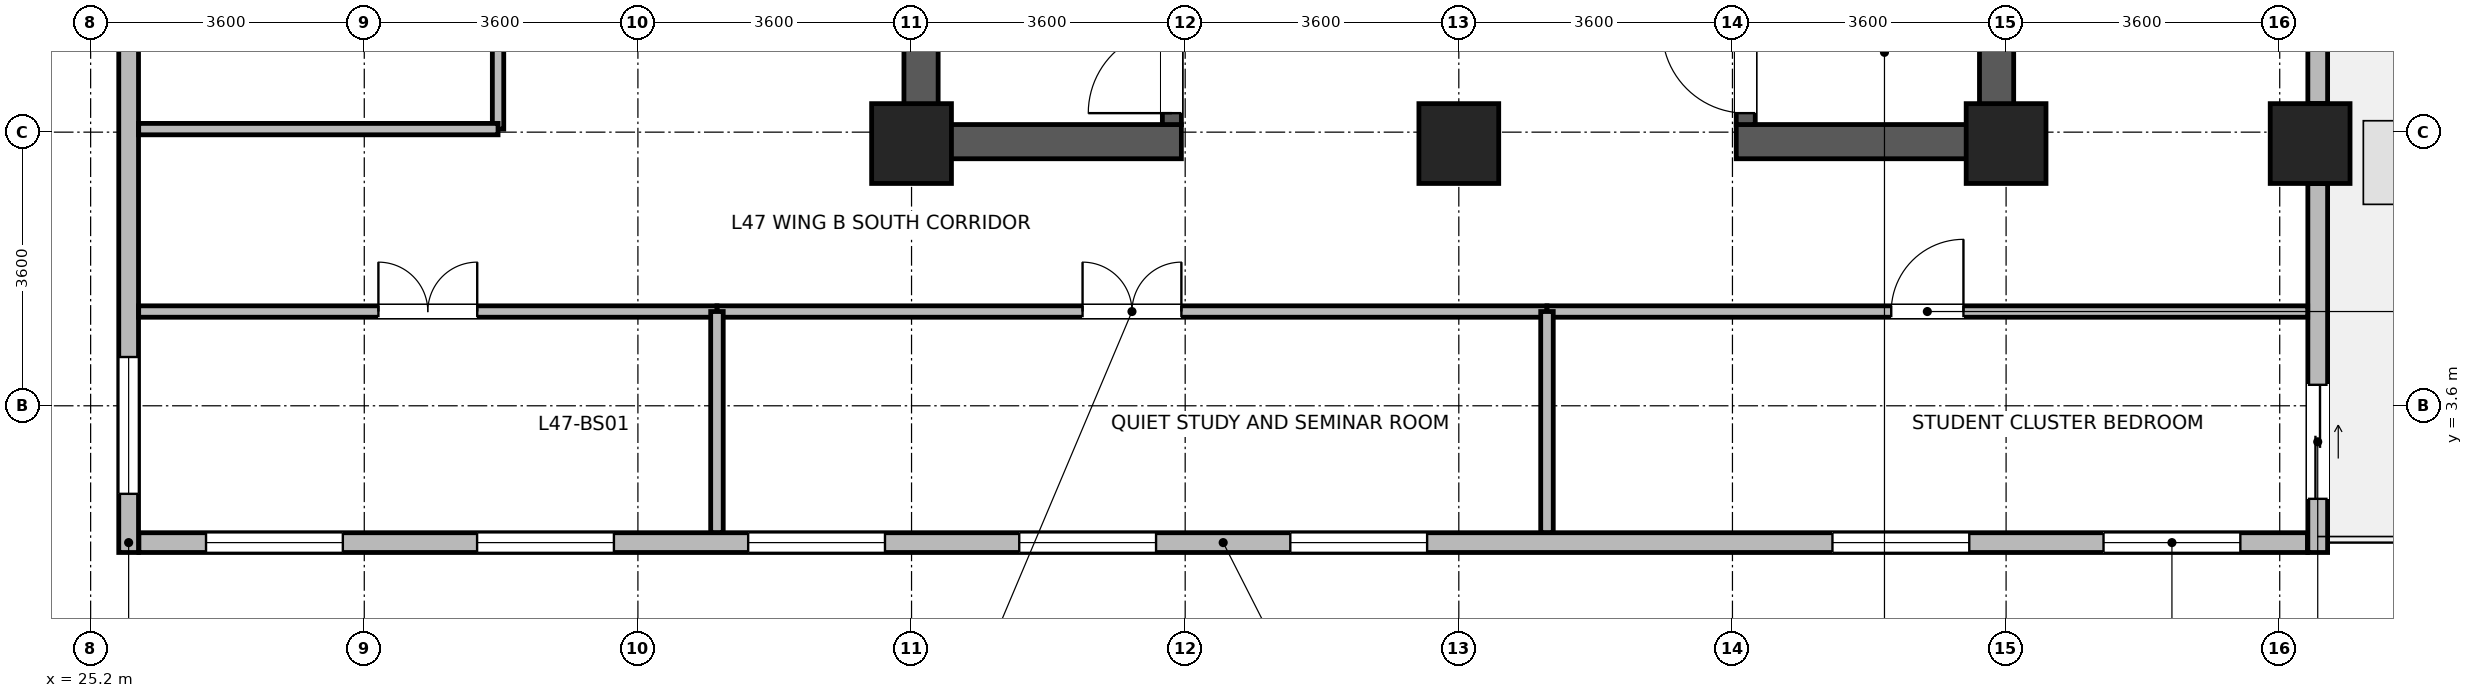
"""IFC4 building model, lengths in metres.
Left out: names, types, materials, properties, quantities, classifications, styles, units other than length and angle.
Written with IfcOpenShell. Run it as: python <this file> out.ifc"""

import sys

from ifc_helpers import new_model, si_unit, direction, frame, frame_2d, origin, origin_2d, place, context, subcontext, project, spatial, rectangle, extrude, source, transform, mapped, element, fill, save


model = new_model("IFC4")
c1 = context("Model", 3, precision=1e-05, world=origin(), true_north=direction((0.0, 1.0)))
c2 = subcontext(c1, "Body", "Model", "MODEL_VIEW")
j1 = project(units=[si_unit("LENGTHUNIT", "METRE"), si_unit("PLANEANGLEUNIT", "RADIAN")], contexts=[c1])
p1 = place(None, origin())
s1 = spatial("IfcSite", under=j1, at=p1, CompositionType="ELEMENT")
p2 = place(p1, origin())
s2 = spatial("IfcBuilding", under=s1, at=p2, CompositionType="ELEMENT")
p3 = place(p2, frame((0.0, 0.0, 184.6)))
s3 = spatial("IfcBuildingStorey", under=s2, at=p3, CompositionType="ELEMENT", Elevation=184.6)
for number, where, z_axis, x_axis in (
    (1, (36.125, 6.85, 0.0), (0.0, 0.0, 1.0), (0.0, 1.0, 0.0)),
    (2, (50.275, 6.85, 0.0), (0.0, 0.0, 1.0), (0.0, 1.0, 0.0)),
):
    element("IfcWall", number, at=place(p3, frame(where, z_axis=z_axis, x_axis=x_axis)), inside=s3, PredefinedType="SHEAR", context=c2, shape_type="SweptSolid", body=[
        extrude(rectangle(XDim=7.9, YDim=0.45, at=frame_2d((3.95, 0.0))), origin(), (0.0, 0.0, 1.0), 3.46),
    ])
for number, where, z_axis, x_axis in (
    (3, (36.35, 7.075, 0.0), (0.0, 0.0, 1.0), (1.0, 0.0, 0.0)),
    (4, (46.85, 7.075, 0.0), (0.0, 0.0, 1.0), (1.0, 0.0, 0.0)),
):
    element("IfcWall", number, at=place(p3, frame(where, z_axis=z_axis, x_axis=x_axis)), inside=s3, PredefinedType="SHEAR", context=c2, shape_type="SweptSolid", body=[
        extrude(rectangle(XDim=3.2, YDim=0.45, at=frame_2d((1.6, 0.0))), origin(), (0.0, 0.0, 1.0), 3.46),
    ])
p4 = place(p3, frame((39.425, 7.3, 0.0), z_axis=(0.0, 0.0, 1.0), x_axis=(0.0, 1.0, 0.0)))
e5 = element("IfcWall", 5, at=p4, inside=s3, PredefinedType="SHEAR", context=c2, shape_type="SweptSolid", body=[
    extrude(rectangle(XDim=7.0, YDim=0.25, at=frame_2d((3.5, 0.0))), origin(), (0.0, 0.0, 1.0), 3.46),
])
p5 = place(p4, frame((0.15, 0.0, 0.0)))
e6 = element("IfcOpeningElement", 6, at=p5, cuts=e5, PredefinedType="OPENING", context=c2, shape_type="SweptSolid", body=[
    extrude(rectangle(XDim=1.1, YDim=2.08, at=frame_2d((0.55, 1.04))), frame((0.0, 0.135, 0.0), z_axis=(0.0, -1.0, 0.0), x_axis=(1.0, 0.0, 0.0)), (0.0, 0.0, 1.0), 0.27),
])
p6 = place(p3, frame((46.975, 7.3, 0.0), z_axis=(0.0, 0.0, 1.0), x_axis=(0.0, 1.0, 0.0)))
e7 = element("IfcWall", 7, at=p6, inside=s3, PredefinedType="SHEAR", context=c2, shape_type="SweptSolid", body=[
    extrude(rectangle(XDim=7.0, YDim=0.25, at=frame_2d((3.5, 0.0))), origin(), (0.0, 0.0, 1.0), 3.46),
])
p7 = place(p6, frame((0.15, 0.0, 0.0)))
e8 = element("IfcOpeningElement", 8, at=p7, cuts=e7, PredefinedType="OPENING", context=c2, shape_type="SweptSolid", body=[
    extrude(rectangle(XDim=1.1, YDim=2.08, at=frame_2d((0.55, 1.04))), frame((0.0, 0.135, 0.0), z_axis=(0.0, -1.0, 0.0), x_axis=(1.0, 0.0, 0.0)), (0.0, 0.0, 1.0), 0.27),
])
m1 = source(origin(), c2, "Body", "SweptSolid", [
    extrude(rectangle(XDim=1.05, YDim=1.05, at=origin_2d()), origin(), (0.0, 0.0, 1.0), 3.7),
])
for number, where, z_axis, x_axis in (
    (9, (36.0, 7.05, 0.0), (0.0, 0.0, 1.0), (1.0, 0.0, 0.0)),
    (10, (43.2, 7.05, 0.0), (0.0, 0.0, 1.0), (1.0, 0.0, 0.0)),
    (11, (50.4, 7.05, 0.0), (0.0, 0.0, 1.0), (1.0, 0.0, 0.0)),
    (12, (54.4, 7.05, 0.0), (0.0, 0.0, 1.0), (1.0, 0.0, 0.0)),
):
    element("IfcColumn", number, at=place(p3, frame(where, z_axis=z_axis, x_axis=x_axis)), inside=s3, PredefinedType="COLUMN", context=c2, shape_type="MappedRepresentation", body=[
        mapped(m1, transform((0.0, 0.0, 0.0), x_axis=(1.0, 0.0, 0.0), y_axis=(0.0, 1.0, 0.0), z_axis=(0.0, 0.0, 1.0), scale=1.0)),
    ])
p8 = place(p3, frame((54.365, 1.8, 0.0), z_axis=(0.0, 0.0, 1.0), x_axis=(-1.0, 0.0, 0.0)))
e13 = element("IfcWall", 13, at=p8, inside=s3, PredefinedType="STANDARD", context=c2, shape_type="SweptSolid", body=[
    extrude(rectangle(XDim=28.53, YDim=0.26, at=frame_2d((14.265, 0.0))), origin(), (0.0, 0.0, 1.0), 3.44),
])
p9 = place(p8, frame((0.883, 0.0, 0.85)))
e14 = element("IfcOpeningElement", 14, at=p9, cuts=e13, PredefinedType="OPENING", context=c2, shape_type="SweptSolid", body=[
    extrude(rectangle(XDim=1.8, YDim=1.85, at=frame_2d((0.9, 0.925))), frame((0.0, 0.14, 0.0), z_axis=(0.0, -1.0, 0.0), x_axis=(1.0, 0.0, 0.0)), (0.0, 0.0, 1.0), 0.28),
])
p10 = place(p8, frame((4.449, 0.0, 0.85)))
e15 = element("IfcOpeningElement", 15, at=p10, cuts=e13, PredefinedType="OPENING", context=c2, shape_type="SweptSolid", body=[
    extrude(rectangle(XDim=1.8, YDim=1.85, at=frame_2d((0.9, 0.925))), frame((0.0, 0.14, 0.0), z_axis=(0.0, -1.0, 0.0), x_axis=(1.0, 0.0, 0.0)), (0.0, 0.0, 1.0), 0.28),
])
p11 = place(p8, frame((11.582, 0.0, 0.85)))
e16 = element("IfcOpeningElement", 16, at=p11, cuts=e13, PredefinedType="OPENING", context=c2, shape_type="SweptSolid", body=[
    extrude(rectangle(XDim=1.8, YDim=1.85, at=frame_2d((0.9, 0.925))), frame((0.0, 0.14, 0.0), z_axis=(0.0, -1.0, 0.0), x_axis=(1.0, 0.0, 0.0)), (0.0, 0.0, 1.0), 0.28),
])
p12 = place(p8, frame((15.148, 0.0, 0.85)))
e17 = element("IfcOpeningElement", 17, at=p12, cuts=e13, PredefinedType="OPENING", context=c2, shape_type="SweptSolid", body=[
    extrude(rectangle(XDim=1.8, YDim=1.85, at=frame_2d((0.9, 0.925))), frame((0.0, 0.14, 0.0), z_axis=(0.0, -1.0, 0.0), x_axis=(1.0, 0.0, 0.0)), (0.0, 0.0, 1.0), 0.28),
])
p13 = place(p8, frame((18.714, 0.0, 0.85)))
e18 = element("IfcOpeningElement", 18, at=p13, cuts=e13, PredefinedType="OPENING", context=c2, shape_type="SweptSolid", body=[
    extrude(rectangle(XDim=1.8, YDim=1.85, at=frame_2d((0.9, 0.925))), frame((0.0, 0.14, 0.0), z_axis=(0.0, -1.0, 0.0), x_axis=(1.0, 0.0, 0.0)), (0.0, 0.0, 1.0), 0.28),
])
p14 = place(p8, frame((22.281, 0.0, 0.85)))
e19 = element("IfcOpeningElement", 19, at=p14, cuts=e13, PredefinedType="OPENING", context=c2, shape_type="SweptSolid", body=[
    extrude(rectangle(XDim=1.8, YDim=1.85, at=frame_2d((0.9, 0.925))), frame((0.0, 0.14, 0.0), z_axis=(0.0, -1.0, 0.0), x_axis=(1.0, 0.0, 0.0)), (0.0, 0.0, 1.0), 0.28),
])
p15 = place(p8, frame((25.847, 0.0, 0.85)))
e20 = element("IfcOpeningElement", 20, at=p15, cuts=e13, PredefinedType="OPENING", context=c2, shape_type="SweptSolid", body=[
    extrude(rectangle(XDim=1.8, YDim=1.85, at=frame_2d((0.9, 0.925))), frame((0.0, 0.14, 0.0), z_axis=(0.0, -1.0, 0.0), x_axis=(1.0, 0.0, 0.0)), (0.0, 0.0, 1.0), 0.28),
])
p16 = place(p3, frame((54.5, 6.524, 0.0), z_axis=(0.0, 0.0, 1.0), x_axis=(0.0, -1.0, 0.0)))
e21 = element("IfcWall", 21, at=p16, inside=s3, PredefinedType="STANDARD", context=c2, shape_type="SweptSolid", body=[
    extrude(rectangle(XDim=4.854, YDim=0.26, at=frame_2d((2.427, 0.0))), origin(), (0.0, 0.0, 1.0), 3.44),
])
p17 = place(p16, frame((2.648, 0.0, 0.0)))
e22 = element("IfcOpeningElement", 22, at=p17, cuts=e21, PredefinedType="OPENING", context=c2, shape_type="SweptSolid", body=[
    extrude(rectangle(XDim=1.5, YDim=2.15, at=frame_2d((0.75, 1.075))), frame((0.0, 0.14, 0.0), z_axis=(0.0, -1.0, 0.0), x_axis=(1.0, 0.0, 0.0)), (0.0, 0.0, 1.0), 0.28),
])
p18 = place(p3, frame((54.5, 14.024, 0.0), z_axis=(0.0, 0.0, 1.0), x_axis=(0.0, -1.0, 0.0)))
e23 = element("IfcWall", 23, at=p18, inside=s3, PredefinedType="STANDARD", context=c2, shape_type="SweptSolid", body=[
    extrude(rectangle(XDim=6.448, YDim=0.26, at=frame_2d((3.224, 0.0))), origin(), (0.0, 0.0, 1.0), 2.99),
])
p19 = place(p18, frame((3.936, 0.0, 0.85)))
e24 = element("IfcOpeningElement", 24, at=p19, cuts=e23, PredefinedType="OPENING", context=c2, shape_type="SweptSolid", body=[
    extrude(rectangle(XDim=1.8, YDim=1.85, at=frame_2d((0.9, 0.925))), frame((0.0, 0.14, 0.0), z_axis=(0.0, -1.0, 0.0), x_axis=(1.0, 0.0, 0.0)), (0.0, 0.0, 1.0), 0.28),
])
p20 = place(p18, frame((1.15, 0.0, 0.85)))
e25 = element("IfcOpeningElement", 25, at=p20, cuts=e23, PredefinedType="OPENING", context=c2, shape_type="SweptSolid", body=[
    extrude(rectangle(XDim=0.95, YDim=1.75, at=frame_2d((0.475, 0.875))), frame((0.0, 0.14, 0.0), z_axis=(0.0, -1.0, 0.0), x_axis=(1.0, 0.0, 0.0)), (0.0, 0.0, 1.0), 0.28),
])
p21 = place(p3, frame((25.7, 1.67, 0.0), z_axis=(0.0, 0.0, 1.0), x_axis=(0.0, 1.0, 0.0)))
e26 = element("IfcWall", 26, at=p21, inside=s3, PredefinedType="STANDARD", context=c2, shape_type="SweptSolid", body=[
    extrude(rectangle(XDim=20.06, YDim=0.26, at=frame_2d((10.03, 0.0))), origin(), (0.0, 0.0, 1.0), 3.44),
])
p22 = place(p21, frame((0.772, 0.0, 0.85)))
e27 = element("IfcOpeningElement", 27, at=p22, cuts=e26, PredefinedType="OPENING", context=c2, shape_type="SweptSolid", body=[
    extrude(rectangle(XDim=1.8, YDim=1.85, at=frame_2d((0.9, 0.925))), frame((0.0, 0.14, 0.0), z_axis=(0.0, -1.0, 0.0), x_axis=(1.0, 0.0, 0.0)), (0.0, 0.0, 1.0), 0.28),
])
p23 = place(p21, frame((7.458, 0.0, 0.85)))
e28 = element("IfcOpeningElement", 28, at=p23, cuts=e26, PredefinedType="OPENING", context=c2, shape_type="SweptSolid", body=[
    extrude(rectangle(XDim=1.8, YDim=1.85, at=frame_2d((0.9, 0.925))), frame((0.0, 0.14, 0.0), z_axis=(0.0, -1.0, 0.0), x_axis=(1.0, 0.0, 0.0)), (0.0, 0.0, 1.0), 0.28),
])
p24 = place(p21, frame((14.145, 0.0, 0.85)))
e29 = element("IfcOpeningElement", 29, at=p24, cuts=e26, PredefinedType="OPENING", context=c2, shape_type="SweptSolid", body=[
    extrude(rectangle(XDim=1.8, YDim=1.85, at=frame_2d((0.9, 0.925))), frame((0.0, 0.14, 0.0), z_axis=(0.0, -1.0, 0.0), x_axis=(1.0, 0.0, 0.0)), (0.0, 0.0, 1.0), 0.28),
])
p25 = place(p21, frame((17.488, 0.0, 0.85)))
e30 = element("IfcOpeningElement", 30, at=p25, cuts=e26, PredefinedType="OPENING", context=c2, shape_type="SweptSolid", body=[
    extrude(rectangle(XDim=1.8, YDim=1.85, at=frame_2d((0.9, 0.925))), frame((0.0, 0.14, 0.0), z_axis=(0.0, -1.0, 0.0), x_axis=(1.0, 0.0, 0.0)), (0.0, 0.0, 1.0), 0.28),
])
p26 = place(p3, frame((33.44, 4.84, 0.0), z_axis=(0.0, 0.0, 1.0), x_axis=(1.0, 0.0, 0.0)))
e31 = element("IfcWall", 31, at=p26, inside=s3, PredefinedType="PARTITIONING", context=c2, shape_type="SweptSolid", body=[
    extrude(rectangle(XDim=10.92, YDim=0.15, at=frame_2d((5.46, 0.0))), origin(), (0.0, 0.0, 1.0), 3.44),
])
p27 = place(p26, frame((4.81, 0.0, 0.0)))
e32 = element("IfcOpeningElement", 32, at=p27, cuts=e31, PredefinedType="OPENING", context=c2, shape_type="SweptSolid", body=[
    extrude(rectangle(XDim=1.3, YDim=2.12, at=frame_2d((0.65, 1.06))), frame((0.0, 0.085, 0.0), z_axis=(0.0, -1.0, 0.0), x_axis=(1.0, 0.0, 0.0)), (0.0, 0.0, 1.0), 0.17),
])
p28 = place(p3, frame((44.36, 4.84, 0.0), z_axis=(0.0, 0.0, 1.0), x_axis=(1.0, 0.0, 0.0)))
e33 = element("IfcWall", 33, at=p28, inside=s3, PredefinedType="PARTITIONING", context=c2, shape_type="SweptSolid", body=[
    extrude(rectangle(XDim=10.008, YDim=0.15, at=frame_2d((5.004, 0.0))), origin(), (0.0, 0.0, 1.0), 3.44),
])
p29 = place(p28, frame((4.529, 0.0, 0.0)))
e34 = element("IfcOpeningElement", 34, at=p29, cuts=e33, PredefinedType="OPENING", context=c2, shape_type="SweptSolid", body=[
    extrude(rectangle(XDim=0.95, YDim=2.1, at=frame_2d((0.475, 1.05))), frame((0.0, 0.085, 0.0), z_axis=(0.0, -1.0, 0.0), x_axis=(1.0, 0.0, 0.0)), (0.0, 0.0, 1.0), 0.17),
])
p30 = place(p3, frame((25.832, 4.84, 0.0), z_axis=(0.0, 0.0, 1.0), x_axis=(1.0, 0.0, 0.0)))
e35 = element("IfcWall", 35, at=p30, inside=s3, PredefinedType="PARTITIONING", context=c2, shape_type="SweptSolid", body=[
    extrude(rectangle(XDim=7.608, YDim=0.15, at=frame_2d((3.804, 0.0))), origin(), (0.0, 0.0, 1.0), 3.44),
])
p31 = place(p30, frame((3.154, 0.0, 0.0)))
e36 = element("IfcOpeningElement", 36, at=p31, cuts=e35, PredefinedType="OPENING", context=c2, shape_type="SweptSolid", body=[
    extrude(rectangle(XDim=1.3, YDim=2.12, at=frame_2d((0.65, 1.06))), frame((0.0, 0.085, 0.0), z_axis=(0.0, -1.0, 0.0), x_axis=(1.0, 0.0, 0.0)), (0.0, 0.0, 1.0), 0.17),
])
p32 = place(p3, frame((30.56, 7.24, 0.0), z_axis=(0.0, 0.0, 1.0), x_axis=(0.0, 1.0, 0.0)))
e37 = element("IfcWall", 37, at=p32, inside=s3, PredefinedType="PARTITIONING", context=c2, shape_type="SweptSolid", body=[
    extrude(rectangle(XDim=7.26, YDim=0.15, at=frame_2d((3.63, 0.0))), origin(), (0.0, 0.0, 1.0), 3.44),
])
p33 = place(p32, frame((2.98, 0.0, 0.0)))
e38 = element("IfcOpeningElement", 38, at=p33, cuts=e37, PredefinedType="OPENING", context=c2, shape_type="SweptSolid", body=[
    extrude(rectangle(XDim=1.3, YDim=2.12, at=frame_2d((0.65, 1.06))), frame((0.0, 0.085, 0.0), z_axis=(0.0, -1.0, 0.0), x_axis=(1.0, 0.0, 0.0)), (0.0, 0.0, 1.0), 0.17),
])
p34 = place(p3, frame((25.832, 7.24, 0.0), z_axis=(0.0, 0.0, 1.0), x_axis=(1.0, 0.0, 0.0)))
e39 = element("IfcWall", 39, at=p34, inside=s3, PredefinedType="PARTITIONING", context=c2, shape_type="SweptSolid", body=[
    extrude(rectangle(XDim=4.728, YDim=0.15, at=frame_2d((2.364, 0.0))), origin(), (0.0, 0.0, 1.0), 3.44),
])
for number, where, z_axis, x_axis in (
    (40, (33.44, 1.932, 0.0), (0.0, 0.0, 1.0), (0.0, 1.0, 0.0)),
    (41, (44.36, 1.932, 0.0), (0.0, 0.0, 1.0), (0.0, 1.0, 0.0)),
):
    element("IfcWall", number, at=place(p3, frame(where, z_axis=z_axis, x_axis=x_axis)), inside=s3, PredefinedType="PARTITIONING", context=c2, shape_type="SweptSolid", body=[
        extrude(rectangle(XDim=2.908, YDim=0.165, at=frame_2d((1.454, 0.0))), origin(), (0.0, 0.0, 1.0), 3.44),
    ])
p35 = place(p9, origin())
e42 = element("IfcWindow", 42, at=p35, inside=s3, PartitioningType="SINGLE_PANEL", PredefinedType="WINDOW", context=c2, shape_type="SweptSolid", body=[
    extrude(rectangle(XDim=1.8, YDim=1.85, at=frame_2d((0.9, 0.925))), frame((0.0, 0.03, 0.0), z_axis=(0.0, -1.0, 0.0), x_axis=(1.0, 0.0, 0.0)), (0.0, 0.0, 1.0), 0.06),
])
fill(e14, e42)
p36 = place(p10, origin())
e43 = element("IfcWindow", 43, at=p36, inside=s3, PartitioningType="SINGLE_PANEL", PredefinedType="WINDOW", context=c2, shape_type="SweptSolid", body=[
    extrude(rectangle(XDim=1.8, YDim=1.85, at=frame_2d((0.9, 0.925))), frame((0.0, 0.03, 0.0), z_axis=(0.0, -1.0, 0.0), x_axis=(1.0, 0.0, 0.0)), (0.0, 0.0, 1.0), 0.06),
])
fill(e15, e43)
p37 = place(p11, origin())
e44 = element("IfcWindow", 44, at=p37, inside=s3, PartitioningType="SINGLE_PANEL", PredefinedType="WINDOW", context=c2, shape_type="SweptSolid", body=[
    extrude(rectangle(XDim=1.8, YDim=1.85, at=frame_2d((0.9, 0.925))), frame((0.0, 0.03, 0.0), z_axis=(0.0, -1.0, 0.0), x_axis=(1.0, 0.0, 0.0)), (0.0, 0.0, 1.0), 0.06),
])
fill(e16, e44)
p38 = place(p12, origin())
e45 = element("IfcWindow", 45, at=p38, inside=s3, PartitioningType="SINGLE_PANEL", PredefinedType="WINDOW", context=c2, shape_type="SweptSolid", body=[
    extrude(rectangle(XDim=1.8, YDim=1.85, at=frame_2d((0.9, 0.925))), frame((0.0, 0.03, 0.0), z_axis=(0.0, -1.0, 0.0), x_axis=(1.0, 0.0, 0.0)), (0.0, 0.0, 1.0), 0.06),
])
fill(e17, e45)
p39 = place(p13, origin())
e46 = element("IfcWindow", 46, at=p39, inside=s3, PartitioningType="SINGLE_PANEL", PredefinedType="WINDOW", context=c2, shape_type="SweptSolid", body=[
    extrude(rectangle(XDim=1.8, YDim=1.85, at=frame_2d((0.9, 0.925))), frame((0.0, 0.03, 0.0), z_axis=(0.0, -1.0, 0.0), x_axis=(1.0, 0.0, 0.0)), (0.0, 0.0, 1.0), 0.06),
])
fill(e18, e46)
p40 = place(p14, origin())
e47 = element("IfcWindow", 47, at=p40, inside=s3, PartitioningType="SINGLE_PANEL", PredefinedType="WINDOW", context=c2, shape_type="SweptSolid", body=[
    extrude(rectangle(XDim=1.8, YDim=1.85, at=frame_2d((0.9, 0.925))), frame((0.0, 0.03, 0.0), z_axis=(0.0, -1.0, 0.0), x_axis=(1.0, 0.0, 0.0)), (0.0, 0.0, 1.0), 0.06),
])
fill(e19, e47)
p41 = place(p15, origin())
e48 = element("IfcWindow", 48, at=p41, inside=s3, PartitioningType="SINGLE_PANEL", PredefinedType="WINDOW", context=c2, shape_type="SweptSolid", body=[
    extrude(rectangle(XDim=1.8, YDim=1.85, at=frame_2d((0.9, 0.925))), frame((0.0, 0.03, 0.0), z_axis=(0.0, -1.0, 0.0), x_axis=(1.0, 0.0, 0.0)), (0.0, 0.0, 1.0), 0.06),
])
fill(e20, e48)
p42 = place(p17, origin())
e49 = element("IfcDoor", 49, at=p42, inside=s3, OperationType="SLIDING_TO_LEFT", PredefinedType="DOOR", context=c2, shape_type="SweptSolid", body=[
    extrude(rectangle(XDim=1.5, YDim=2.15, at=frame_2d((0.75, 1.075))), frame((0.0, 0.025, 0.0), z_axis=(0.0, -1.0, 0.0), x_axis=(1.0, 0.0, 0.0)), (0.0, 0.0, 1.0), 0.05),
])
fill(e22, e49)
p43 = place(p22, origin())
e50 = element("IfcWindow", 50, at=p43, inside=s3, PartitioningType="SINGLE_PANEL", PredefinedType="WINDOW", context=c2, shape_type="SweptSolid", body=[
    extrude(rectangle(XDim=1.8, YDim=1.85, at=frame_2d((0.9, 0.925))), frame((0.0, 0.03, 0.0), z_axis=(0.0, -1.0, 0.0), x_axis=(1.0, 0.0, 0.0)), (0.0, 0.0, 1.0), 0.06),
])
fill(e27, e50)
p44 = place(p5, origin())
e51 = element("IfcDoor", 51, at=p44, inside=s3, OperationType="SINGLE_SWING_LEFT", PredefinedType="DOOR", context=c2, shape_type="SweptSolid", body=[
    extrude(rectangle(XDim=1.1, YDim=2.08, at=frame_2d((0.55, 1.04))), frame((0.0, 0.025, 0.0), z_axis=(0.0, -1.0, 0.0), x_axis=(1.0, 0.0, 0.0)), (0.0, 0.0, 1.0), 0.05),
])
fill(e6, e51)
p45 = place(p7, origin())
e52 = element("IfcDoor", 52, at=p45, inside=s3, OperationType="SINGLE_SWING_RIGHT", PredefinedType="DOOR", context=c2, shape_type="SweptSolid", body=[
    extrude(rectangle(XDim=1.1, YDim=2.08, at=frame_2d((0.55, 1.04))), frame((0.0, 0.025, 0.0), z_axis=(0.0, -1.0, 0.0), x_axis=(1.0, 0.0, 0.0)), (0.0, 0.0, 1.0), 0.05),
])
fill(e8, e52)
p46 = place(p27, origin())
e53 = element("IfcDoor", 53, at=p46, inside=s3, OperationType="DOUBLE_DOOR_SINGLE_SWING", PredefinedType="DOOR", context=c2, shape_type="SweptSolid", body=[
    extrude(rectangle(XDim=1.3, YDim=2.12, at=frame_2d((0.65, 1.06))), frame((0.0, 0.025, 0.0), z_axis=(0.0, -1.0, 0.0), x_axis=(1.0, 0.0, 0.0)), (0.0, 0.0, 1.0), 0.05),
])
fill(e32, e53)
p47 = place(p29, origin())
e54 = element("IfcDoor", 54, at=p47, inside=s3, OperationType="SINGLE_SWING_RIGHT", PredefinedType="DOOR", context=c2, shape_type="SweptSolid", body=[
    extrude(rectangle(XDim=0.95, YDim=2.1, at=frame_2d((0.475, 1.05))), frame((0.0, 0.025, 0.0), z_axis=(0.0, -1.0, 0.0), x_axis=(1.0, 0.0, 0.0)), (0.0, 0.0, 1.0), 0.05),
])
fill(e34, e54)
p48 = place(p31, origin())
e55 = element("IfcDoor", 55, at=p48, inside=s3, OperationType="DOUBLE_DOOR_SINGLE_SWING", PredefinedType="DOOR", context=c2, shape_type="SweptSolid", body=[
    extrude(rectangle(XDim=1.3, YDim=2.12, at=frame_2d((0.65, 1.06))), frame((0.0, 0.025, 0.0), z_axis=(0.0, -1.0, 0.0), x_axis=(1.0, 0.0, 0.0)), (0.0, 0.0, 1.0), 0.05),
])
fill(e36, e55)
save(model, sys.argv[1])
